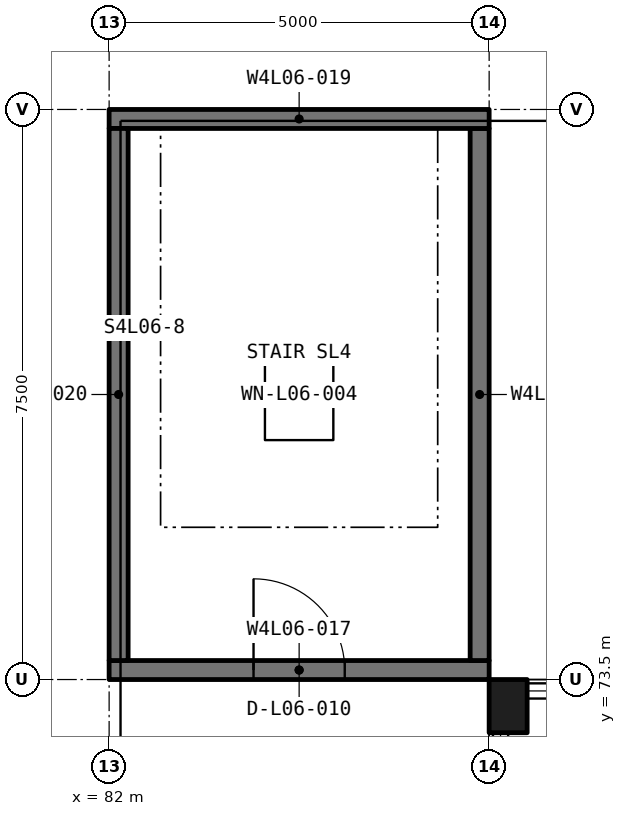
"""IFC4 building model, lengths in metres.
Left out: names, types, materials, properties, quantities, classifications, styles, units other than length and angle.
Written with IfcOpenShell. Run it as: python <this file> out.ifc"""

import sys

from ifc_helpers import new_model, si_unit, direction, frame, frame_2d, origin, origin_2d, place, context, subcontext, project, spatial, rectangle, extrude, element, fill, save


model = new_model("IFC4")
c1 = context("Model", 3, precision=1e-05, world=origin(), true_north=direction((0.0, 1.0)))
c2 = subcontext(c1, "Body", "Model", "MODEL_VIEW")
j1 = project(units=[si_unit("LENGTHUNIT", "METRE"), si_unit("PLANEANGLEUNIT", "RADIAN")], contexts=[c1])
p1 = place(None, origin())
s1 = spatial("IfcSite", under=j1, at=p1, CompositionType="ELEMENT")
p2 = place(p1, origin())
s2 = spatial("IfcBuilding", under=s1, at=p2, CompositionType="ELEMENT")
p3 = place(p2, frame((0.0, 0.0, 29.25)))
s3 = spatial("IfcBuildingStorey", under=s2, at=p3, CompositionType="ELEMENT", Elevation=29.25)
p4 = place(p3, frame((87.25, 73.15, -0.3), z_axis=(0.0, 0.0, 1.0), x_axis=(1.0, 0.0, 0.0)))
e1 = element("IfcColumn", 1, at=p4, inside=s3, PredefinedType="COLUMN", context=c2, shape_type="SweptSolid", body=[
    extrude(rectangle(XDim=0.5, YDim=0.7, at=origin_2d()), origin(), (0.0, 0.0, 1.0), 4.5),
])
p5 = place(p3, frame((82.0, 73.625, -0.3), z_axis=(0.0, 0.0, 1.0), x_axis=(1.0, 0.0, 0.0)))
e2 = element("IfcWall", 2, at=p5, inside=s3, PredefinedType="SHEAR", context=c2, shape_type="SweptSolid", body=[
    extrude(rectangle(XDim=5.0, YDim=0.25, at=frame_2d((2.5, 0.0))), origin(), (0.0, 0.0, 1.0), 3.05),
])
p6 = place(p5, frame((1.9, 0.0, 0.3)))
e3 = element("IfcOpeningElement", 3, at=p6, cuts=e2, PredefinedType="OPENING", context=c2, shape_type="SweptSolid", body=[
    extrude(rectangle(XDim=1.2, YDim=2.2, at=frame_2d((0.6, 1.1))), frame((0.0, 0.135, 0.0), z_axis=(0.0, -1.0, 0.0), x_axis=(1.0, 0.0, 0.0)), (0.0, 0.0, 1.0), 0.27),
])
p7 = place(p3, frame((86.875, 73.75, -0.3), z_axis=(0.0, 0.0, 1.0), x_axis=(0.0, 1.0, 0.0)))
e4 = element("IfcWall", 4, at=p7, inside=s3, PredefinedType="SHEAR", context=c2, shape_type="SweptSolid", body=[
    extrude(rectangle(XDim=7.0, YDim=0.25, at=frame_2d((3.5, 0.0))), origin(), (0.0, 0.0, 1.0), 3.05),
])
p8 = place(p3, frame((82.0, 80.875, -0.3), z_axis=(0.0, 0.0, 1.0), x_axis=(1.0, 0.0, 0.0)))
e5 = element("IfcWall", 5, at=p8, inside=s3, PredefinedType="SHEAR", context=c2, shape_type="SweptSolid", body=[
    extrude(rectangle(XDim=5.0, YDim=0.25, at=frame_2d((2.5, 0.0))), origin(), (0.0, 0.0, 1.0), 3.05),
])
p9 = place(p3, frame((82.125, 73.75, -0.3), z_axis=(0.0, 0.0, 1.0), x_axis=(0.0, 1.0, 0.0)))
e6 = element("IfcWall", 6, at=p9, inside=s3, PredefinedType="SHEAR", context=c2, shape_type="SweptSolid", body=[
    extrude(rectangle(XDim=7.0, YDim=0.25, at=frame_2d((3.5, 0.0))), origin(), (0.0, 0.0, 1.0), 3.05),
])
p10 = place(p3, frame((0.0, 0.0, 2.75)))
p11 = place(p10, frame((84.5, 77.25, -0.01)))
p12 = place(p11, frame((0.0, 0.0, 0.21)))
e7 = element("IfcWindow", 7, at=p12, inside=s3, PartitioningType="SINGLE_PANEL", PredefinedType="SKYLIGHT", context=c2, shape_type="SweptSolid", body=[
    extrude(rectangle(XDim=0.9, YDim=1.2, at=origin_2d()), origin(), (0.0, 0.0, 1.0), 0.05),
])
p13 = place(p6, origin())
e8 = element("IfcDoor", 8, at=p13, inside=s3, OperationType="SINGLE_SWING_LEFT", PredefinedType="DOOR", context=c2, shape_type="SweptSolid", body=[
    extrude(rectangle(XDim=1.2, YDim=2.2, at=frame_2d((0.6, 1.1))), frame((0.0, 0.025, 0.0), z_axis=(0.0, -1.0, 0.0), x_axis=(1.0, 0.0, 0.0)), (0.0, 0.0, 1.0), 0.05),
])
fill(e3, e8)
save(model, sys.argv[1])
